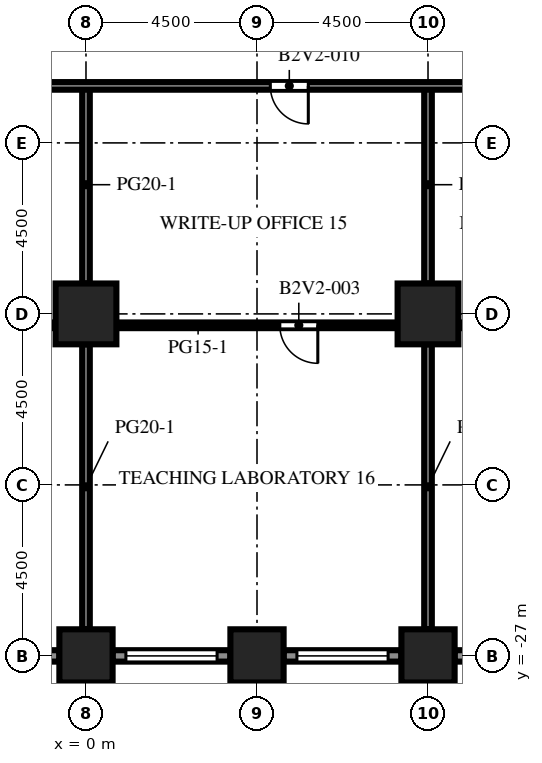
"""IFC4 building model, lengths in metres.
Left out: names, types, materials, properties, quantities, classifications, styles, units other than length and angle.
Written with IfcOpenShell. Run it as: python <this file> out.ifc"""

import sys

from ifc_helpers import new_model, si_unit, direction, frame, frame_2d, origin, origin_2d, place, context, subcontext, project, spatial, rectangle, extrude, element, fill, save


model = new_model("IFC4")
c1 = context("Model", 3, precision=1e-05, world=origin(), true_north=direction((0.0, 1.0)))
c2 = subcontext(c1, "Body", "Model", "MODEL_VIEW")
j1 = project(units=[si_unit("LENGTHUNIT", "METRE"), si_unit("PLANEANGLEUNIT", "RADIAN")], contexts=[c1])
p1 = place(None, origin())
s1 = spatial("IfcSite", under=j1, at=p1, CompositionType="ELEMENT")
p2 = place(p1, origin())
s2 = spatial("IfcBuilding", under=s1, at=p2, CompositionType="ELEMENT")
p3 = place(p2, frame((0.0, 0.0, 62.4)))
s3 = spatial("IfcBuildingStorey", under=s2, at=p3, CompositionType="ELEMENT", Elevation=62.4)
for number, where, z_axis, x_axis in (
    (1, (0.0, -27.0, 0.0), (0.0, 0.0, 1.0), (1.0, 0.0, 0.0)),
    (2, (4.5, -27.0, 0.0), (0.0, 0.0, 1.0), (1.0, 0.0, 0.0)),
    (3, (9.0, -27.0, 0.0), (0.0, 0.0, 1.0), (1.0, 0.0, 0.0)),
):
    element("IfcColumn", number, at=place(p3, frame(where, z_axis=z_axis, x_axis=x_axis)), inside=s3, PredefinedType="COLUMN", context=c2, shape_type="SweptSolid", body=[
        extrude(rectangle(XDim=1.4, YDim=1.4, at=origin_2d()), origin(), (0.0, 0.0, 1.0), 4.1),
    ])
for number, where, z_axis, x_axis in (
    (4, (0.0, -18.0, 0.0), (0.0, 0.0, 1.0), (1.0, 0.0, 0.0)),
    (5, (9.0, -18.0, 0.0), (0.0, 0.0, 1.0), (1.0, 0.0, 0.0)),
):
    element("IfcColumn", number, at=place(p3, frame(where, z_axis=z_axis, x_axis=x_axis)), inside=s3, PredefinedType="COLUMN", context=c2, shape_type="SweptSolid", body=[
        extrude(rectangle(XDim=1.6, YDim=1.6, at=origin_2d()), origin(), (0.0, 0.0, 1.0), 4.1),
    ])
p4 = place(p3, frame((-0.7, -27.0, 0.0), z_axis=(0.0, 0.0, 1.0), x_axis=(-1.0, 0.0, 0.0)))
e6 = element("IfcWall", 6, at=p4, inside=s3, PredefinedType="SOLIDWALL", context=c2, shape_type="SweptSolid", body=[
    extrude(rectangle(XDim=3.1, YDim=0.3, at=frame_2d((1.55, 0.0))), origin(), (0.0, 0.0, 1.0), 2.75),
])
p5 = place(p4, frame((0.35, 0.0, 0.8)))
e7 = element("IfcOpeningElement", 7, at=p5, cuts=e6, PredefinedType="OPENING", context=c2, shape_type="SweptSolid", body=[
    extrude(rectangle(XDim=2.4, YDim=1.7, at=frame_2d((1.2, 0.85))), frame((0.0, 0.16, 0.0), z_axis=(0.0, -1.0, 0.0), x_axis=(1.0, 0.0, 0.0)), (0.0, 0.0, 1.0), 0.32),
])
p6 = place(p3, frame((3.8, -27.0, 0.0), z_axis=(0.0, 0.0, 1.0), x_axis=(-1.0, 0.0, 0.0)))
e8 = element("IfcWall", 8, at=p6, inside=s3, PredefinedType="SOLIDWALL", context=c2, shape_type="SweptSolid", body=[
    extrude(rectangle(XDim=3.1, YDim=0.3, at=frame_2d((1.55, 0.0))), origin(), (0.0, 0.0, 1.0), 2.75),
])
p7 = place(p6, frame((0.35, 0.0, 0.8)))
e9 = element("IfcOpeningElement", 9, at=p7, cuts=e8, PredefinedType="OPENING", context=c2, shape_type="SweptSolid", body=[
    extrude(rectangle(XDim=2.4, YDim=1.7, at=frame_2d((1.2, 0.85))), frame((0.0, 0.16, 0.0), z_axis=(0.0, -1.0, 0.0), x_axis=(1.0, 0.0, 0.0)), (0.0, 0.0, 1.0), 0.32),
])
p8 = place(p3, frame((8.3, -27.0, 0.0), z_axis=(0.0, 0.0, 1.0), x_axis=(-1.0, 0.0, 0.0)))
e10 = element("IfcWall", 10, at=p8, inside=s3, PredefinedType="SOLIDWALL", context=c2, shape_type="SweptSolid", body=[
    extrude(rectangle(XDim=3.1, YDim=0.3, at=frame_2d((1.55, 0.0))), origin(), (0.0, 0.0, 1.0), 2.75),
])
p9 = place(p8, frame((0.35, 0.0, 0.8)))
e11 = element("IfcOpeningElement", 11, at=p9, cuts=e10, PredefinedType="OPENING", context=c2, shape_type="SweptSolid", body=[
    extrude(rectangle(XDim=2.4, YDim=1.7, at=frame_2d((1.2, 0.85))), frame((0.0, 0.16, 0.0), z_axis=(0.0, -1.0, 0.0), x_axis=(1.0, 0.0, 0.0)), (0.0, 0.0, 1.0), 0.32),
])
p10 = place(p3, frame((12.8, -27.0, 0.0), z_axis=(0.0, 0.0, 1.0), x_axis=(-1.0, 0.0, 0.0)))
e12 = element("IfcWall", 12, at=p10, inside=s3, PredefinedType="SOLIDWALL", context=c2, shape_type="SweptSolid", body=[
    extrude(rectangle(XDim=3.1, YDim=0.3, at=frame_2d((1.55, 0.0))), origin(), (0.0, 0.0, 1.0), 2.75),
])
p11 = place(p10, frame((0.35, 0.0, 0.8)))
e13 = element("IfcOpeningElement", 13, at=p11, cuts=e12, PredefinedType="OPENING", context=c2, shape_type="SweptSolid", body=[
    extrude(rectangle(XDim=2.4, YDim=1.7, at=frame_2d((1.2, 0.85))), frame((0.0, 0.16, 0.0), z_axis=(0.0, -1.0, 0.0), x_axis=(1.0, 0.0, 0.0)), (0.0, 0.0, 1.0), 0.32),
])
p12 = place(p3, frame((0.0, -26.3, 0.0), z_axis=(0.0, 0.0, 1.0), x_axis=(0.0, 1.0, 0.0)))
e14 = element("IfcWall", 14, at=p12, inside=s3, PredefinedType="PARTITIONING", context=c2, shape_type="SweptSolid", body=[
    extrude(rectangle(XDim=7.5, YDim=0.2, at=frame_2d((3.75, 0.0))), origin(), (0.0, 0.0, 1.0), 3.65),
])
p13 = place(p3, frame((0.0, -17.2, 0.0), z_axis=(0.0, 0.0, 1.0), x_axis=(0.0, 1.0, 0.0)))
e15 = element("IfcWall", 15, at=p13, inside=s3, PredefinedType="PARTITIONING", context=c2, shape_type="SweptSolid", body=[
    extrude(rectangle(XDim=5.2, YDim=0.2, at=frame_2d((2.6, 0.0))), origin(), (0.0, 0.0, 1.0), 3.65),
])
p14 = place(p3, frame((9.0, -26.3, 0.0), z_axis=(0.0, 0.0, 1.0), x_axis=(0.0, 1.0, 0.0)))
e16 = element("IfcWall", 16, at=p14, inside=s3, PredefinedType="PARTITIONING", context=c2, shape_type="SweptSolid", body=[
    extrude(rectangle(XDim=7.5, YDim=0.2, at=frame_2d((3.75, 0.0))), origin(), (0.0, 0.0, 1.0), 3.65),
])
p15 = place(p3, frame((9.0, -17.2, 0.0), z_axis=(0.0, 0.0, 1.0), x_axis=(0.0, 1.0, 0.0)))
e17 = element("IfcWall", 17, at=p15, inside=s3, PredefinedType="PARTITIONING", context=c2, shape_type="SweptSolid", body=[
    extrude(rectangle(XDim=5.2, YDim=0.2, at=frame_2d((2.6, 0.0))), origin(), (0.0, 0.0, 1.0), 3.65),
])
p16 = place(p3, frame((-0.8, -18.3, 0.0), z_axis=(0.0, 0.0, 1.0), x_axis=(-1.0, 0.0, 0.0)))
e18 = element("IfcWall", 18, at=p16, inside=s3, PredefinedType="PARTITIONING", context=c2, shape_type="SweptSolid", body=[
    extrude(rectangle(XDim=7.4, YDim=0.15, at=frame_2d((3.7, 0.0))), origin(), (0.0, 0.0, 1.0), 3.65),
])
p17 = place(p16, frame((1.85, 0.0, 0.0)))
e19 = element("IfcOpeningElement", 19, at=p17, cuts=e18, PredefinedType="OPENING", context=c2, shape_type="SweptSolid", body=[
    extrude(rectangle(XDim=1.0, YDim=2.1, at=frame_2d((0.5, 1.05))), frame((0.0, 0.085, 0.0), z_axis=(0.0, -1.0, 0.0), x_axis=(1.0, 0.0, 0.0)), (0.0, 0.0, 1.0), 0.17),
])
p18 = place(p3, frame((8.2, -18.3, 0.0), z_axis=(0.0, 0.0, 1.0), x_axis=(-1.0, 0.0, 0.0)))
e20 = element("IfcWall", 20, at=p18, inside=s3, PredefinedType="PARTITIONING", context=c2, shape_type="SweptSolid", body=[
    extrude(rectangle(XDim=7.4, YDim=0.15, at=frame_2d((3.7, 0.0))), origin(), (0.0, 0.0, 1.0), 3.65),
])
p19 = place(p18, frame((2.1, 0.0, 0.0)))
e21 = element("IfcOpeningElement", 21, at=p19, cuts=e20, PredefinedType="OPENING", context=c2, shape_type="SweptSolid", body=[
    extrude(rectangle(XDim=1.0, YDim=2.1, at=frame_2d((0.5, 1.05))), frame((0.0, 0.085, 0.0), z_axis=(0.0, -1.0, 0.0), x_axis=(1.0, 0.0, 0.0)), (0.0, 0.0, 1.0), 0.17),
])
p20 = place(p3, frame((17.2, -18.3, 0.0), z_axis=(0.0, 0.0, 1.0), x_axis=(-1.0, 0.0, 0.0)))
e22 = element("IfcWall", 22, at=p20, inside=s3, PredefinedType="PARTITIONING", context=c2, shape_type="SweptSolid", body=[
    extrude(rectangle(XDim=7.4, YDim=0.15, at=frame_2d((3.7, 0.0))), origin(), (0.0, 0.0, 1.0), 3.65),
])
p21 = place(p20, frame((1.85, 0.0, 0.0)))
e23 = element("IfcOpeningElement", 23, at=p21, cuts=e22, PredefinedType="OPENING", context=c2, shape_type="SweptSolid", body=[
    extrude(rectangle(XDim=1.0, YDim=2.1, at=frame_2d((0.5, 1.05))), frame((0.0, 0.085, 0.0), z_axis=(0.0, -1.0, 0.0), x_axis=(1.0, 0.0, 0.0)), (0.0, 0.0, 1.0), 0.17),
])
p22 = place(p3, frame((31.35, -12.0, 0.0), z_axis=(0.0, 0.0, 1.0), x_axis=(-1.0, 0.0, 0.0)))
e24 = element("IfcWall", 24, at=p22, inside=s3, PredefinedType="PARTITIONING", context=c2, shape_type="SweptSolid", body=[
    extrude(rectangle(XDim=53.7, YDim=0.2, at=frame_2d((26.85, 0.0))), origin(), (0.0, 0.0, 1.0), 3.65),
])
p23 = place(p22, frame((45.25, 0.0, 0.0)))
e25 = element("IfcOpeningElement", 25, at=p23, cuts=e24, PredefinedType="OPENING", context=c2, shape_type="SweptSolid", body=[
    extrude(rectangle(XDim=1.0, YDim=2.1, at=frame_2d((0.5, 1.05))), frame((0.0, 0.11, 0.0), z_axis=(0.0, -1.0, 0.0), x_axis=(1.0, 0.0, 0.0)), (0.0, 0.0, 1.0), 0.22),
])
p24 = place(p22, frame((34.25, 0.0, 0.0)))
e26 = element("IfcOpeningElement", 26, at=p24, cuts=e24, PredefinedType="OPENING", context=c2, shape_type="SweptSolid", body=[
    extrude(rectangle(XDim=1.0, YDim=2.1, at=frame_2d((0.5, 1.05))), frame((0.0, 0.11, 0.0), z_axis=(0.0, -1.0, 0.0), x_axis=(1.0, 0.0, 0.0)), (0.0, 0.0, 1.0), 0.22),
])
p25 = place(p22, frame((25.5, 0.0, 0.0)))
e27 = element("IfcOpeningElement", 27, at=p25, cuts=e24, PredefinedType="OPENING", context=c2, shape_type="SweptSolid", body=[
    extrude(rectangle(XDim=1.0, YDim=2.1, at=frame_2d((0.5, 1.05))), frame((0.0, 0.11, 0.0), z_axis=(0.0, -1.0, 0.0), x_axis=(1.0, 0.0, 0.0)), (0.0, 0.0, 1.0), 0.22),
])
p26 = place(p22, frame((15.0, 0.0, 0.0)))
e28 = element("IfcOpeningElement", 28, at=p26, cuts=e24, PredefinedType="OPENING", context=c2, shape_type="SweptSolid", body=[
    extrude(rectangle(XDim=1.0, YDim=2.1, at=frame_2d((0.5, 1.05))), frame((0.0, 0.11, 0.0), z_axis=(0.0, -1.0, 0.0), x_axis=(1.0, 0.0, 0.0)), (0.0, 0.0, 1.0), 0.22),
])
p27 = place(p22, frame((5.0, 0.0, 0.0)))
e29 = element("IfcOpeningElement", 29, at=p27, cuts=e24, PredefinedType="OPENING", context=c2, shape_type="SweptSolid", body=[
    extrude(rectangle(XDim=1.0, YDim=2.1, at=frame_2d((0.5, 1.05))), frame((0.0, 0.11, 0.0), z_axis=(0.0, -1.0, 0.0), x_axis=(1.0, 0.0, 0.0)), (0.0, 0.0, 1.0), 0.22),
])
p28 = place(p7, origin())
e30 = element("IfcWindow", 30, at=p28, inside=s3, PartitioningType="SINGLE_PANEL", PredefinedType="WINDOW", context=c2, shape_type="SweptSolid", body=[
    extrude(rectangle(XDim=2.4, YDim=1.7, at=frame_2d((1.2, 0.85))), frame((0.0, 0.03, 0.0), z_axis=(0.0, -1.0, 0.0), x_axis=(1.0, 0.0, 0.0)), (0.0, 0.0, 1.0), 0.06),
])
fill(e9, e30)
p29 = place(p9, origin())
e31 = element("IfcWindow", 31, at=p29, inside=s3, PartitioningType="SINGLE_PANEL", PredefinedType="WINDOW", context=c2, shape_type="SweptSolid", body=[
    extrude(rectangle(XDim=2.4, YDim=1.7, at=frame_2d((1.2, 0.85))), frame((0.0, 0.03, 0.0), z_axis=(0.0, -1.0, 0.0), x_axis=(1.0, 0.0, 0.0)), (0.0, 0.0, 1.0), 0.06),
])
fill(e11, e31)
p30 = place(p19, origin())
e32 = element("IfcDoor", 32, at=p30, inside=s3, OperationType="SINGLE_SWING_LEFT", PredefinedType="DOOR", context=c2, shape_type="SweptSolid", body=[
    extrude(rectangle(XDim=1.0, YDim=2.1, at=frame_2d((0.5, 1.05))), frame((0.0, 0.025, 0.0), z_axis=(0.0, -1.0, 0.0), x_axis=(1.0, 0.0, 0.0)), (0.0, 0.0, 1.0), 0.05),
])
fill(e21, e32)
p31 = place(p25, origin())
e33 = element("IfcDoor", 33, at=p31, inside=s3, OperationType="SINGLE_SWING_LEFT", PredefinedType="DOOR", context=c2, shape_type="SweptSolid", body=[
    extrude(rectangle(XDim=1.0, YDim=2.1, at=frame_2d((0.5, 1.05))), frame((0.0, 0.025, 0.0), z_axis=(0.0, -1.0, 0.0), x_axis=(1.0, 0.0, 0.0)), (0.0, 0.0, 1.0), 0.05),
])
fill(e27, e33)
save(model, sys.argv[1])
